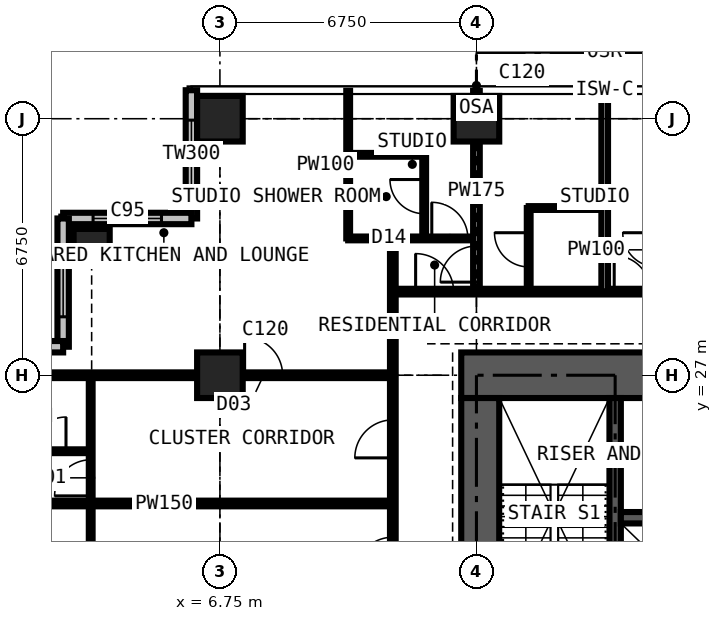
"""IFC4 building model, lengths in metres.
Left out: names, types, materials, properties, quantities, classifications, styles, units other than length and angle.
Written with IfcOpenShell. Run it as: python <this file> out.ifc"""

import sys

from ifc_helpers import new_model, si_unit, direction, frame, frame_2d, origin, origin_2d, place, context, subcontext, project, spatial, rectangle, extrude, element, fill, save


model = new_model("IFC4")
c1 = context("Model", 3, precision=1e-05, world=origin(), true_north=direction((0.0, 1.0)))
c2 = subcontext(c1, "Body", "Model", "MODEL_VIEW")
j1 = project(units=[si_unit("LENGTHUNIT", "METRE"), si_unit("PLANEANGLEUNIT", "RADIAN")], contexts=[c1])
p1 = place(None, origin())
s1 = spatial("IfcSite", under=j1, at=p1, CompositionType="ELEMENT")
p2 = place(p1, origin())
s2 = spatial("IfcBuilding", under=s1, at=p2, CompositionType="ELEMENT")
p3 = place(p2, frame((0.0, 0.0, 181.8)))
s3 = spatial("IfcBuildingStorey", under=s2, at=p3, CompositionType="ELEMENT", Elevation=181.8)
p4 = place(p3, frame((3.375, 30.375, 0.0), z_axis=(0.0, 0.0, 1.0), x_axis=(1.0, 0.0, 0.0)))
e1 = element("IfcColumn", 1, at=p4, inside=s3, PredefinedType="COLUMN", context=c2, shape_type="SweptSolid", body=[
    extrude(rectangle(XDim=0.95, YDim=0.95, at=origin_2d()), origin(), (0.0, 0.0, 1.0), 3.6),
])
for number, where, z_axis, x_axis in (
    (2, (6.75, 27.0, 0.0), (0.0, 0.0, 1.0), (1.0, 0.0, 0.0)),
    (3, (6.75, 33.75, 0.0), (0.0, 0.0, 1.0), (1.0, 0.0, 0.0)),
    (4, (13.5, 33.75, 0.0), (0.0, 0.0, 1.0), (1.0, 0.0, 0.0)),
):
    element("IfcColumn", number, at=place(p3, frame(where, z_axis=z_axis, x_axis=x_axis)), inside=s3, PredefinedType="COLUMN", context=c2, shape_type="SweptSolid", body=[
        extrude(rectangle(XDim=1.2, YDim=1.2, at=origin_2d()), origin(), (0.0, 0.0, 1.0), 3.6),
    ])
p5 = place(p3, frame((27.4, 27.0, 0.0), z_axis=(0.0, 0.0, 1.0), x_axis=(-1.0, 0.0, 0.0)))
e5 = element("IfcWall", 5, at=p5, inside=s3, PredefinedType="SHEAR", context=c2, shape_type="SweptSolid", body=[
    extrude(rectangle(XDim=14.3, YDim=1.2, at=frame_2d((7.15, 0.0))), origin(), (0.0, 0.0, 1.0), 3.6),
])
p6 = place(p5, frame((5.225, 0.0, 0.0)))
e6 = element("IfcOpeningElement", 6, at=p6, cuts=e5, PredefinedType="OPENING", context=c2, shape_type="SweptSolid", body=[
    extrude(rectangle(XDim=0.9, YDim=2.2, at=frame_2d((0.45, 1.1))), frame((0.0, 0.61, 0.0), z_axis=(0.0, -1.0, 0.0), x_axis=(1.0, 0.0, 0.0)), (0.0, 0.0, 1.0), 1.22),
])
p7 = place(p5, frame((8.2, 0.0, 0.0)))
e7 = element("IfcOpeningElement", 7, at=p7, cuts=e5, PredefinedType="OPENING", context=c2, shape_type="SweptSolid", body=[
    extrude(rectangle(XDim=1.0, YDim=2.2, at=frame_2d((0.5, 1.1))), frame((0.0, 0.61, 0.0), z_axis=(0.0, -1.0, 0.0), x_axis=(1.0, 0.0, 0.0)), (0.0, 0.0, 1.0), 1.22),
])
p8 = place(p3, frame((13.6, 26.4, 0.0), z_axis=(0.0, 0.0, 1.0), x_axis=(0.0, -1.0, 0.0)))
e8 = element("IfcWall", 8, at=p8, inside=s3, PredefinedType="SHEAR", context=c2, shape_type="SweptSolid", body=[
    extrude(rectangle(XDim=12.3, YDim=1.0, at=frame_2d((6.15, 0.0))), origin(), (0.0, 0.0, 1.0), 3.6),
])
p9 = place(p8, frame((7.45, 0.0, 0.0)))
e9 = element("IfcOpeningElement", 9, at=p9, cuts=e8, PredefinedType="OPENING", context=c2, shape_type="SweptSolid", body=[
    extrude(rectangle(XDim=1.2, YDim=2.2, at=frame_2d((0.6, 1.1))), frame((0.0, 0.51, 0.0), z_axis=(0.0, -1.0, 0.0), x_axis=(1.0, 0.0, 0.0)), (0.0, 0.0, 1.0), 1.02),
])
p10 = place(p3, frame((6.0, 34.5, 0.0), z_axis=(0.0, 0.0, 1.0), x_axis=(0.0, -1.0, 0.0)))
e10 = element("IfcWall", 10, at=p10, inside=s3, PredefinedType="SOLIDWALL", context=c2, shape_type="SweptSolid", body=[
    extrude(rectangle(XDim=3.375, YDim=0.3, at=frame_2d((1.688, 0.0))), origin(), (0.0, 0.0, 1.0), 3.375),
])
p11 = place(p10, frame((0.788, 0.0, 0.6)))
e11 = element("IfcOpeningElement", 11, at=p11, cuts=e10, PredefinedType="OPENING", context=c2, shape_type="SweptSolid", body=[
    extrude(rectangle(XDim=1.8, YDim=2.1, at=frame_2d((0.9, 1.05))), frame((0.0, 0.16, 0.0), z_axis=(0.0, -1.0, 0.0), x_axis=(1.0, 0.0, 0.0)), (0.0, 0.0, 1.0), 0.32),
])
p12 = place(p3, frame((6.0, 31.125, 0.0), z_axis=(0.0, 0.0, 1.0), x_axis=(-1.0, 0.0, 0.0)))
e12 = element("IfcWall", 12, at=p12, inside=s3, PredefinedType="SOLIDWALL", context=c2, shape_type="SweptSolid", body=[
    extrude(rectangle(XDim=3.375, YDim=0.3, at=frame_2d((1.688, 0.0))), origin(), (0.0, 0.0, 1.0), 3.375),
])
p13 = place(p12, frame((0.788, 0.0, 0.6)))
e13 = element("IfcOpeningElement", 13, at=p13, cuts=e12, PredefinedType="OPENING", context=c2, shape_type="SweptSolid", body=[
    extrude(rectangle(XDim=1.8, YDim=2.1, at=frame_2d((0.9, 1.05))), frame((0.0, 0.16, 0.0), z_axis=(0.0, -1.0, 0.0), x_axis=(1.0, 0.0, 0.0)), (0.0, 0.0, 1.0), 0.32),
])
p14 = place(p3, frame((2.625, 31.125, 0.0), z_axis=(0.0, 0.0, 1.0), x_axis=(0.0, -1.0, 0.0)))
e14 = element("IfcWall", 14, at=p14, inside=s3, PredefinedType="SOLIDWALL", context=c2, shape_type="SweptSolid", body=[
    extrude(rectangle(XDim=3.375, YDim=0.3, at=frame_2d((1.688, 0.0))), origin(), (0.0, 0.0, 1.0), 3.375),
])
p15 = place(p14, frame((0.788, 0.0, 0.6)))
e15 = element("IfcOpeningElement", 15, at=p15, cuts=e14, PredefinedType="OPENING", context=c2, shape_type="SweptSolid", body=[
    extrude(rectangle(XDim=1.8, YDim=2.1, at=frame_2d((0.9, 1.05))), frame((0.0, 0.16, 0.0), z_axis=(0.0, -1.0, 0.0), x_axis=(1.0, 0.0, 0.0)), (0.0, 0.0, 1.0), 0.32),
])
p16 = place(p3, frame((2.625, 27.75, 0.0), z_axis=(0.0, 0.0, 1.0), x_axis=(-1.0, 0.0, 0.0)))
e16 = element("IfcWall", 16, at=p16, inside=s3, PredefinedType="SOLIDWALL", context=c2, shape_type="SweptSolid", body=[
    extrude(rectangle(XDim=3.375, YDim=0.3, at=frame_2d((1.688, 0.0))), origin(), (0.0, 0.0, 1.0), 3.375),
])
p17 = place(p16, frame((0.788, 0.0, 0.6)))
e17 = element("IfcOpeningElement", 17, at=p17, cuts=e16, PredefinedType="OPENING", context=c2, shape_type="SweptSolid", body=[
    extrude(rectangle(XDim=1.8, YDim=2.1, at=frame_2d((0.9, 1.05))), frame((0.0, 0.16, 0.0), z_axis=(0.0, -1.0, 0.0), x_axis=(1.0, 0.0, 0.0)), (0.0, 0.0, 1.0), 0.32),
])
p18 = place(p3, frame((17.15, 20.3, 0.0), z_axis=(0.0, 0.0, 1.0), x_axis=(0.0, 1.0, 0.0)))
e18 = element("IfcWall", 18, at=p18, inside=s3, PredefinedType="SHEAR", context=c2, shape_type="SweptSolid", body=[
    extrude(rectangle(XDim=6.1, YDim=0.3, at=frame_2d((3.05, 0.0))), origin(), (0.0, 0.0, 1.0), 3.6),
])
p19 = place(p3, frame((17.3, 23.25, 0.0), z_axis=(0.0, 0.0, 1.0), x_axis=(1.0, 0.0, 0.0)))
e19 = element("IfcWall", 19, at=p19, inside=s3, PredefinedType="SHEAR", context=c2, shape_type="SweptSolid", body=[
    extrude(rectangle(XDim=5.9, YDim=0.3, at=frame_2d((2.95, 0.0))), origin(), (0.0, 0.0, 1.0), 3.6),
])
p20 = place(p3, frame((-0.734, 23.625, 0.0), z_axis=(0.0, 0.0, 1.0), x_axis=(1.0, 0.0, 0.0)))
e20 = element("IfcWall", 20, at=p20, inside=s3, PredefinedType="PARTITIONING", context=c2, shape_type="SweptSolid", body=[
    extrude(rectangle(XDim=12.034, YDim=0.15, at=frame_2d((6.017, 0.0))), origin(), (0.0, 0.0, 1.0), 3.375),
])
p21 = place(p3, frame((-0.734, 27.0, 0.0), z_axis=(0.0, 0.0, 1.0), x_axis=(1.0, 0.0, 0.0)))
e21 = element("IfcWall", 21, at=p21, inside=s3, PredefinedType="PARTITIONING", context=c2, shape_type="SweptSolid", body=[
    extrude(rectangle(XDim=12.034, YDim=0.15, at=frame_2d((6.017, 0.0))), origin(), (0.0, 0.0, 1.0), 2.806),
])
p22 = place(p21, frame((8.134, 0.0, 0.0)))
e22 = element("IfcOpeningElement", 22, at=p22, cuts=e21, PredefinedType="OPENING", context=c2, shape_type="SweptSolid", body=[
    extrude(rectangle(XDim=1.0, YDim=2.2, at=frame_2d((0.5, 1.1))), frame((0.0, 0.085, 0.0), z_axis=(0.0, -1.0, 0.0), x_axis=(1.0, 0.0, 0.0)), (0.0, 0.0, 1.0), 0.17),
])
p23 = place(p3, frame((1.15, 25.0, 0.0), z_axis=(0.0, 0.0, 1.0), x_axis=(1.0, 0.0, 0.0)))
e23 = element("IfcWall", 23, at=p23, inside=s3, PredefinedType="PARTITIONING", context=c2, shape_type="SweptSolid", body=[
    extrude(rectangle(XDim=2.2, YDim=0.1, at=frame_2d((1.1, 0.0))), origin(), (0.0, 0.0, 1.0), 3.375),
])
p24 = place(p23, frame((0.65, 0.0, 0.0)))
e24 = element("IfcOpeningElement", 24, at=p24, cuts=e23, PredefinedType="OPENING", context=c2, shape_type="SweptSolid", body=[
    extrude(rectangle(XDim=0.9, YDim=2.2, at=frame_2d((0.45, 1.1))), frame((0.0, 0.06, 0.0), z_axis=(0.0, -1.0, 0.0), x_axis=(1.0, 0.0, 0.0)), (0.0, 0.0, 1.0), 0.12),
])
p25 = place(p3, frame((3.35, 10.125, 0.0), z_axis=(0.0, 0.0, 1.0), x_axis=(0.0, 1.0, 0.0)))
e25 = element("IfcWall", 25, at=p25, inside=s3, PredefinedType="PARTITIONING", context=c2, shape_type="SweptSolid", body=[
    extrude(rectangle(XDim=16.875, YDim=0.1, at=frame_2d((8.438, 0.0))), origin(), (0.0, 0.0, 1.0), 3.375),
])
p26 = place(p25, frame((13.7, 0.0, 0.0)))
e26 = element("IfcOpeningElement", 26, at=p26, cuts=e25, PredefinedType="OPENING", context=c2, shape_type="SweptSolid", body=[
    extrude(rectangle(XDim=0.95, YDim=2.2, at=frame_2d((0.475, 1.1))), frame((0.0, 0.06, 0.0), z_axis=(0.0, -1.0, 0.0), x_axis=(1.0, 0.0, 0.0)), (0.0, 0.0, 1.0), 0.12),
])
p27 = place(p25, frame((0.2, 0.0, 0.0)))
e27 = element("IfcOpeningElement", 27, at=p27, cuts=e25, PredefinedType="OPENING", context=c2, shape_type="SweptSolid", body=[
    extrude(rectangle(XDim=0.95, YDim=2.2, at=frame_2d((0.475, 1.1))), frame((0.0, 0.06, 0.0), z_axis=(0.0, -1.0, 0.0), x_axis=(1.0, 0.0, 0.0)), (0.0, 0.0, 1.0), 0.12),
])
p28 = place(p25, frame((3.575, 0.0, 0.0)))
e28 = element("IfcOpeningElement", 28, at=p28, cuts=e25, PredefinedType="OPENING", context=c2, shape_type="SweptSolid", body=[
    extrude(rectangle(XDim=0.95, YDim=2.2, at=frame_2d((0.475, 1.1))), frame((0.0, 0.06, 0.0), z_axis=(0.0, -1.0, 0.0), x_axis=(1.0, 0.0, 0.0)), (0.0, 0.0, 1.0), 0.12),
])
p29 = place(p25, frame((6.95, 0.0, 0.0)))
e29 = element("IfcOpeningElement", 29, at=p29, cuts=e25, PredefinedType="OPENING", context=c2, shape_type="SweptSolid", body=[
    extrude(rectangle(XDim=0.95, YDim=2.2, at=frame_2d((0.475, 1.1))), frame((0.0, 0.06, 0.0), z_axis=(0.0, -1.0, 0.0), x_axis=(1.0, 0.0, 0.0)), (0.0, 0.0, 1.0), 0.12),
])
p30 = place(p25, frame((10.325, 0.0, 0.0)))
e30 = element("IfcOpeningElement", 30, at=p30, cuts=e25, PredefinedType="OPENING", context=c2, shape_type="SweptSolid", body=[
    extrude(rectangle(XDim=0.95, YDim=2.2, at=frame_2d((0.475, 1.1))), frame((0.0, 0.06, 0.0), z_axis=(0.0, -1.0, 0.0), x_axis=(1.0, 0.0, 0.0)), (0.0, 0.0, 1.0), 0.12),
])
p31 = place(p3, frame((10.125, 30.6, 0.0), z_axis=(0.0, 0.0, 1.0), x_axis=(0.0, 1.0, 0.0)))
e31 = element("IfcWall", 31, at=p31, inside=s3, PredefinedType="PARTITIONING", context=c2, shape_type="SweptSolid", body=[
    extrude(rectangle(XDim=3.884, YDim=0.1, at=frame_2d((1.942, 0.0))), origin(), (0.0, 0.0, 1.0), 3.375),
])
p32 = place(p3, frame((10.125, 30.6, 0.0), z_axis=(0.0, 0.0, 1.0), x_axis=(1.0, 0.0, 0.0)))
e32 = element("IfcWall", 32, at=p32, inside=s3, PredefinedType="PARTITIONING", context=c2, shape_type="SweptSolid", body=[
    extrude(rectangle(XDim=3.375, YDim=0.1, at=frame_2d((1.688, 0.0))), origin(), (0.0, 0.0, 1.0), 3.375),
])
p33 = place(p32, frame((2.2, 0.0, 0.0)))
e33 = element("IfcOpeningElement", 33, at=p33, cuts=e32, PredefinedType="OPENING", context=c2, shape_type="SweptSolid", body=[
    extrude(rectangle(XDim=0.95, YDim=2.2, at=frame_2d((0.475, 1.1))), frame((0.0, 0.06, 0.0), z_axis=(0.0, -1.0, 0.0), x_axis=(1.0, 0.0, 0.0)), (0.0, 0.0, 1.0), 0.12),
])
p34 = place(p3, frame((10.125, 32.8, 0.0), z_axis=(0.0, 0.0, 1.0), x_axis=(1.0, 0.0, 0.0)))
e34 = element("IfcWall", 34, at=p34, inside=s3, PredefinedType="PARTITIONING", context=c2, shape_type="SweptSolid", body=[
    extrude(rectangle(XDim=2.0, YDim=0.1, at=frame_2d((1.0, 0.0))), origin(), (0.0, 0.0, 1.0), 3.375),
])
p35 = place(p3, frame((11.3, 11.3, 0.0), z_axis=(0.0, 0.0, 1.0), x_axis=(0.0, 1.0, 0.0)))
e35 = element("IfcWall", 35, at=p35, inside=s3, PredefinedType="PARTITIONING", context=c2, shape_type="SweptSolid", body=[
    extrude(rectangle(XDim=19.3, YDim=0.15, at=frame_2d((9.65, 0.0))), origin(), (0.0, 0.0, 1.0), 3.375),
])
p36 = place(p35, frame((13.525, 0.0, 0.0)))
e36 = element("IfcOpeningElement", 36, at=p36, cuts=e35, PredefinedType="OPENING", context=c2, shape_type="SweptSolid", body=[
    extrude(rectangle(XDim=1.0, YDim=2.2, at=frame_2d((0.5, 1.1))), frame((0.0, 0.085, 0.0), z_axis=(0.0, -1.0, 0.0), x_axis=(1.0, 0.0, 0.0)), (0.0, 0.0, 1.0), 0.17),
])
p37 = place(p35, frame((10.438, 0.0, 0.0)))
e37 = element("IfcOpeningElement", 37, at=p37, cuts=e35, PredefinedType="OPENING", context=c2, shape_type="SweptSolid", body=[
    extrude(rectangle(XDim=1.0, YDim=2.2, at=frame_2d((0.5, 1.1))), frame((0.0, 0.085, 0.0), z_axis=(0.0, -1.0, 0.0), x_axis=(1.0, 0.0, 0.0)), (0.0, 0.0, 1.0), 0.17),
])
p38 = place(p3, frame((11.3, 29.2, 0.0), z_axis=(0.0, 0.0, 1.0), x_axis=(1.0, 0.0, 0.0)))
e38 = element("IfcWall", 38, at=p38, inside=s3, PredefinedType="PARTITIONING", context=c2, shape_type="SweptSolid", body=[
    extrude(rectangle(XDim=19.809, YDim=0.15, at=frame_2d((9.904, 0.0))), origin(), (0.0, 0.0, 1.0), 3.375),
])
p39 = place(p38, frame((14.625, 0.0, 0.0)))
e39 = element("IfcOpeningElement", 39, at=p39, cuts=e38, PredefinedType="OPENING", context=c2, shape_type="SweptSolid", body=[
    extrude(rectangle(XDim=1.0, YDim=2.2, at=frame_2d((0.5, 1.1))), frame((0.0, 0.085, 0.0), z_axis=(0.0, -1.0, 0.0), x_axis=(1.0, 0.0, 0.0)), (0.0, 0.0, 1.0), 0.17),
])
p40 = place(p38, frame((5.825, 0.0, 0.0)))
e40 = element("IfcOpeningElement", 40, at=p40, cuts=e38, PredefinedType="OPENING", context=c2, shape_type="SweptSolid", body=[
    extrude(rectangle(XDim=0.95, YDim=2.2, at=frame_2d((0.475, 1.1))), frame((0.0, 0.085, 0.0), z_axis=(0.0, -1.0, 0.0), x_axis=(1.0, 0.0, 0.0)), (0.0, 0.0, 1.0), 0.17),
])
p41 = place(p38, frame((9.2, 0.0, 0.0)))
e41 = element("IfcOpeningElement", 41, at=p41, cuts=e38, PredefinedType="OPENING", context=c2, shape_type="SweptSolid", body=[
    extrude(rectangle(XDim=0.95, YDim=2.2, at=frame_2d((0.475, 1.1))), frame((0.0, 0.085, 0.0), z_axis=(0.0, -1.0, 0.0), x_axis=(1.0, 0.0, 0.0)), (0.0, 0.0, 1.0), 0.17),
])
p42 = place(p38, frame((0.6, 0.0, 0.0)))
e42 = element("IfcOpeningElement", 42, at=p42, cuts=e38, PredefinedType="OPENING", context=c2, shape_type="SweptSolid", body=[
    extrude(rectangle(XDim=1.0, YDim=2.2, at=frame_2d((0.5, 1.1))), frame((0.0, 0.085, 0.0), z_axis=(0.0, -1.0, 0.0), x_axis=(1.0, 0.0, 0.0)), (0.0, 0.0, 1.0), 0.17),
])
p43 = place(p3, frame((12.125, 30.6, 0.0), z_axis=(0.0, 0.0, 1.0), x_axis=(0.0, 1.0, 0.0)))
e43 = element("IfcWall", 43, at=p43, inside=s3, PredefinedType="PARTITIONING", context=c2, shape_type="SweptSolid", body=[
    extrude(rectangle(XDim=2.2, YDim=0.1, at=frame_2d((1.1, 0.0))), origin(), (0.0, 0.0, 1.0), 3.375),
])
p44 = place(p43, frame((0.65, 0.0, 0.0)))
e44 = element("IfcOpeningElement", 44, at=p44, cuts=e43, PredefinedType="OPENING", context=c2, shape_type="SweptSolid", body=[
    extrude(rectangle(XDim=0.9, YDim=2.2, at=frame_2d((0.45, 1.1))), frame((0.0, 0.06, 0.0), z_axis=(0.0, -1.0, 0.0), x_axis=(1.0, 0.0, 0.0)), (0.0, 0.0, 1.0), 0.12),
])
p45 = place(p3, frame((13.5, 29.2, 0.0), z_axis=(0.0, 0.0, 1.0), x_axis=(0.0, 1.0, 0.0)))
e45 = element("IfcWall", 45, at=p45, inside=s3, PredefinedType="PARTITIONING", context=c2, shape_type="SweptSolid", body=[
    extrude(rectangle(XDim=5.284, YDim=0.175, at=frame_2d((2.642, 0.0))), origin(), (0.0, 0.0, 1.0), 2.61),
])
p46 = place(p45, frame((0.25, 0.0, 0.0)))
e46 = element("IfcOpeningElement", 46, at=p46, cuts=e45, PredefinedType="OPENING", context=c2, shape_type="SweptSolid", body=[
    extrude(rectangle(XDim=0.95, YDim=2.2, at=frame_2d((0.475, 1.1))), frame((0.0, 0.097, 0.0), z_axis=(0.0, -1.0, 0.0), x_axis=(1.0, 0.0, 0.0)), (0.0, 0.0, 1.0), 0.195),
])
p47 = place(p3, frame((14.875, 29.2, 0.0), z_axis=(0.0, 0.0, 1.0), x_axis=(0.0, 1.0, 0.0)))
e47 = element("IfcWall", 47, at=p47, inside=s3, PredefinedType="PARTITIONING", context=c2, shape_type="SweptSolid", body=[
    extrude(rectangle(XDim=2.2, YDim=0.1, at=frame_2d((1.1, 0.0))), origin(), (0.0, 0.0, 1.0), 3.375),
])
p48 = place(p47, frame((0.65, 0.0, 0.0)))
e48 = element("IfcOpeningElement", 48, at=p48, cuts=e47, PredefinedType="OPENING", context=c2, shape_type="SweptSolid", body=[
    extrude(rectangle(XDim=0.9, YDim=2.2, at=frame_2d((0.45, 1.1))), frame((0.0, 0.06, 0.0), z_axis=(0.0, -1.0, 0.0), x_axis=(1.0, 0.0, 0.0)), (0.0, 0.0, 1.0), 0.12),
])
p49 = place(p3, frame((14.875, 31.4, 0.0), z_axis=(0.0, 0.0, 1.0), x_axis=(1.0, 0.0, 0.0)))
e49 = element("IfcWall", 49, at=p49, inside=s3, PredefinedType="PARTITIONING", context=c2, shape_type="SweptSolid", body=[
    extrude(rectangle(XDim=2.0, YDim=0.1, at=frame_2d((1.0, 0.0))), origin(), (0.0, 0.0, 1.0), 3.375),
])
p50 = place(p3, frame((16.875, 29.2, 0.0), z_axis=(0.0, 0.0, 1.0), x_axis=(0.0, 1.0, 0.0)))
e50 = element("IfcWall", 50, at=p50, inside=s3, PredefinedType="PARTITIONING", context=c2, shape_type="SweptSolid", body=[
    extrude(rectangle(XDim=5.284, YDim=0.175, at=frame_2d((2.642, 0.0))), origin(), (0.0, 0.0, 1.0), 3.375),
])
p51 = place(p11, origin())
e51 = element("IfcWindow", 51, at=p51, inside=s3, PartitioningType="SINGLE_PANEL", PredefinedType="WINDOW", context=c2, shape_type="SweptSolid", body=[
    extrude(rectangle(XDim=1.8, YDim=2.1, at=frame_2d((0.9, 1.05))), frame((0.0, 0.03, 0.0), z_axis=(0.0, -1.0, 0.0), x_axis=(1.0, 0.0, 0.0)), (0.0, 0.0, 1.0), 0.06),
])
fill(e11, e51)
p52 = place(p13, origin())
e52 = element("IfcWindow", 52, at=p52, inside=s3, PartitioningType="SINGLE_PANEL", PredefinedType="WINDOW", context=c2, shape_type="SweptSolid", body=[
    extrude(rectangle(XDim=1.8, YDim=2.1, at=frame_2d((0.9, 1.05))), frame((0.0, 0.03, 0.0), z_axis=(0.0, -1.0, 0.0), x_axis=(1.0, 0.0, 0.0)), (0.0, 0.0, 1.0), 0.06),
])
fill(e13, e52)
p53 = place(p15, origin())
e53 = element("IfcWindow", 53, at=p53, inside=s3, PartitioningType="SINGLE_PANEL", PredefinedType="WINDOW", context=c2, shape_type="SweptSolid", body=[
    extrude(rectangle(XDim=1.8, YDim=2.1, at=frame_2d((0.9, 1.05))), frame((0.0, 0.03, 0.0), z_axis=(0.0, -1.0, 0.0), x_axis=(1.0, 0.0, 0.0)), (0.0, 0.0, 1.0), 0.06),
])
fill(e15, e53)
p54 = place(p33, origin())
e54 = element("IfcDoor", 54, at=p54, inside=s3, OperationType="SINGLE_SWING_LEFT", PredefinedType="DOOR", context=c2, shape_type="SweptSolid", body=[
    extrude(rectangle(XDim=0.95, YDim=2.2, at=frame_2d((0.475, 1.1))), frame((0.0, 0.025, 0.0), z_axis=(0.0, -1.0, 0.0), x_axis=(1.0, 0.0, 0.0)), (0.0, 0.0, 1.0), 0.05),
])
fill(e33, e54)
p55 = place(p44, origin())
e55 = element("IfcDoor", 55, at=p55, inside=s3, OperationType="SINGLE_SWING_RIGHT", PredefinedType="DOOR", context=c2, shape_type="SweptSolid", body=[
    extrude(rectangle(XDim=0.9, YDim=2.2, at=frame_2d((0.45, 1.1))), frame((0.0, 0.025, 0.0), z_axis=(0.0, -1.0, 0.0), x_axis=(1.0, 0.0, 0.0)), (0.0, 0.0, 1.0), 0.05),
])
fill(e44, e55)
p56 = place(p46, origin())
e56 = element("IfcDoor", 56, at=p56, inside=s3, OperationType="SINGLE_SWING_LEFT", PredefinedType="DOOR", context=c2, shape_type="SweptSolid", body=[
    extrude(rectangle(XDim=0.95, YDim=2.2, at=frame_2d((0.475, 1.1))), frame((0.0, 0.025, 0.0), z_axis=(0.0, -1.0, 0.0), x_axis=(1.0, 0.0, 0.0)), (0.0, 0.0, 1.0), 0.05),
])
fill(e46, e56)
p57 = place(p48, origin())
e57 = element("IfcDoor", 57, at=p57, inside=s3, OperationType="SINGLE_SWING_RIGHT", PredefinedType="DOOR", context=c2, shape_type="SweptSolid", body=[
    extrude(rectangle(XDim=0.9, YDim=2.2, at=frame_2d((0.45, 1.1))), frame((0.0, 0.025, 0.0), z_axis=(0.0, -1.0, 0.0), x_axis=(1.0, 0.0, 0.0)), (0.0, 0.0, 1.0), 0.05),
])
fill(e48, e57)
p58 = place(p40, origin())
e58 = element("IfcDoor", 58, at=p58, inside=s3, OperationType="SINGLE_SWING_LEFT", PredefinedType="DOOR", context=c2, shape_type="SweptSolid", body=[
    extrude(rectangle(XDim=0.95, YDim=2.2, at=frame_2d((0.475, 1.1))), frame((0.0, 0.025, 0.0), z_axis=(0.0, -1.0, 0.0), x_axis=(1.0, 0.0, 0.0)), (0.0, 0.0, 1.0), 0.05),
])
fill(e40, e58)
p59 = place(p42, origin())
e59 = element("IfcDoor", 59, at=p59, inside=s3, OperationType="SINGLE_SWING_LEFT", PredefinedType="DOOR", context=c2, shape_type="SweptSolid", body=[
    extrude(rectangle(XDim=1.0, YDim=2.2, at=frame_2d((0.5, 1.1))), frame((0.0, 0.025, 0.0), z_axis=(0.0, -1.0, 0.0), x_axis=(1.0, 0.0, 0.0)), (0.0, 0.0, 1.0), 0.05),
])
fill(e42, e59)
p60 = place(p22, origin())
e60 = element("IfcDoor", 60, at=p60, inside=s3, OperationType="SINGLE_SWING_LEFT", PredefinedType="DOOR", context=c2, shape_type="SweptSolid", body=[
    extrude(rectangle(XDim=1.0, YDim=2.2, at=frame_2d((0.5, 1.1))), frame((0.0, 0.025, 0.0), z_axis=(0.0, -1.0, 0.0), x_axis=(1.0, 0.0, 0.0)), (0.0, 0.0, 1.0), 0.05),
])
fill(e22, e60)
p61 = place(p26, origin())
e61 = element("IfcDoor", 61, at=p61, inside=s3, OperationType="SINGLE_SWING_LEFT", PredefinedType="DOOR", context=c2, shape_type="SweptSolid", body=[
    extrude(rectangle(XDim=0.95, YDim=2.2, at=frame_2d((0.475, 1.1))), frame((0.0, 0.025, 0.0), z_axis=(0.0, -1.0, 0.0), x_axis=(1.0, 0.0, 0.0)), (0.0, 0.0, 1.0), 0.05),
])
fill(e26, e61)
p62 = place(p24, origin())
e62 = element("IfcDoor", 62, at=p62, inside=s3, OperationType="SINGLE_SWING_RIGHT", PredefinedType="DOOR", context=c2, shape_type="SweptSolid", body=[
    extrude(rectangle(XDim=0.9, YDim=2.2, at=frame_2d((0.45, 1.1))), frame((0.0, 0.025, 0.0), z_axis=(0.0, -1.0, 0.0), x_axis=(1.0, 0.0, 0.0)), (0.0, 0.0, 1.0), 0.05),
])
fill(e24, e62)
p63 = place(p36, origin())
e63 = element("IfcDoor", 63, at=p63, inside=s3, OperationType="SINGLE_SWING_LEFT", PredefinedType="DOOR", context=c2, shape_type="SweptSolid", body=[
    extrude(rectangle(XDim=1.0, YDim=2.2, at=frame_2d((0.5, 1.1))), frame((0.0, 0.025, 0.0), z_axis=(0.0, -1.0, 0.0), x_axis=(1.0, 0.0, 0.0)), (0.0, 0.0, 1.0), 0.05),
])
fill(e36, e63)
p64 = place(p37, origin())
e64 = element("IfcDoor", 64, at=p64, inside=s3, OperationType="SINGLE_SWING_LEFT", PredefinedType="DOOR", context=c2, shape_type="SweptSolid", body=[
    extrude(rectangle(XDim=1.0, YDim=2.2, at=frame_2d((0.5, 1.1))), frame((0.0, 0.025, 0.0), z_axis=(0.0, -1.0, 0.0), x_axis=(1.0, 0.0, 0.0)), (0.0, 0.0, 1.0), 0.05),
])
fill(e37, e64)
save(model, sys.argv[1])
